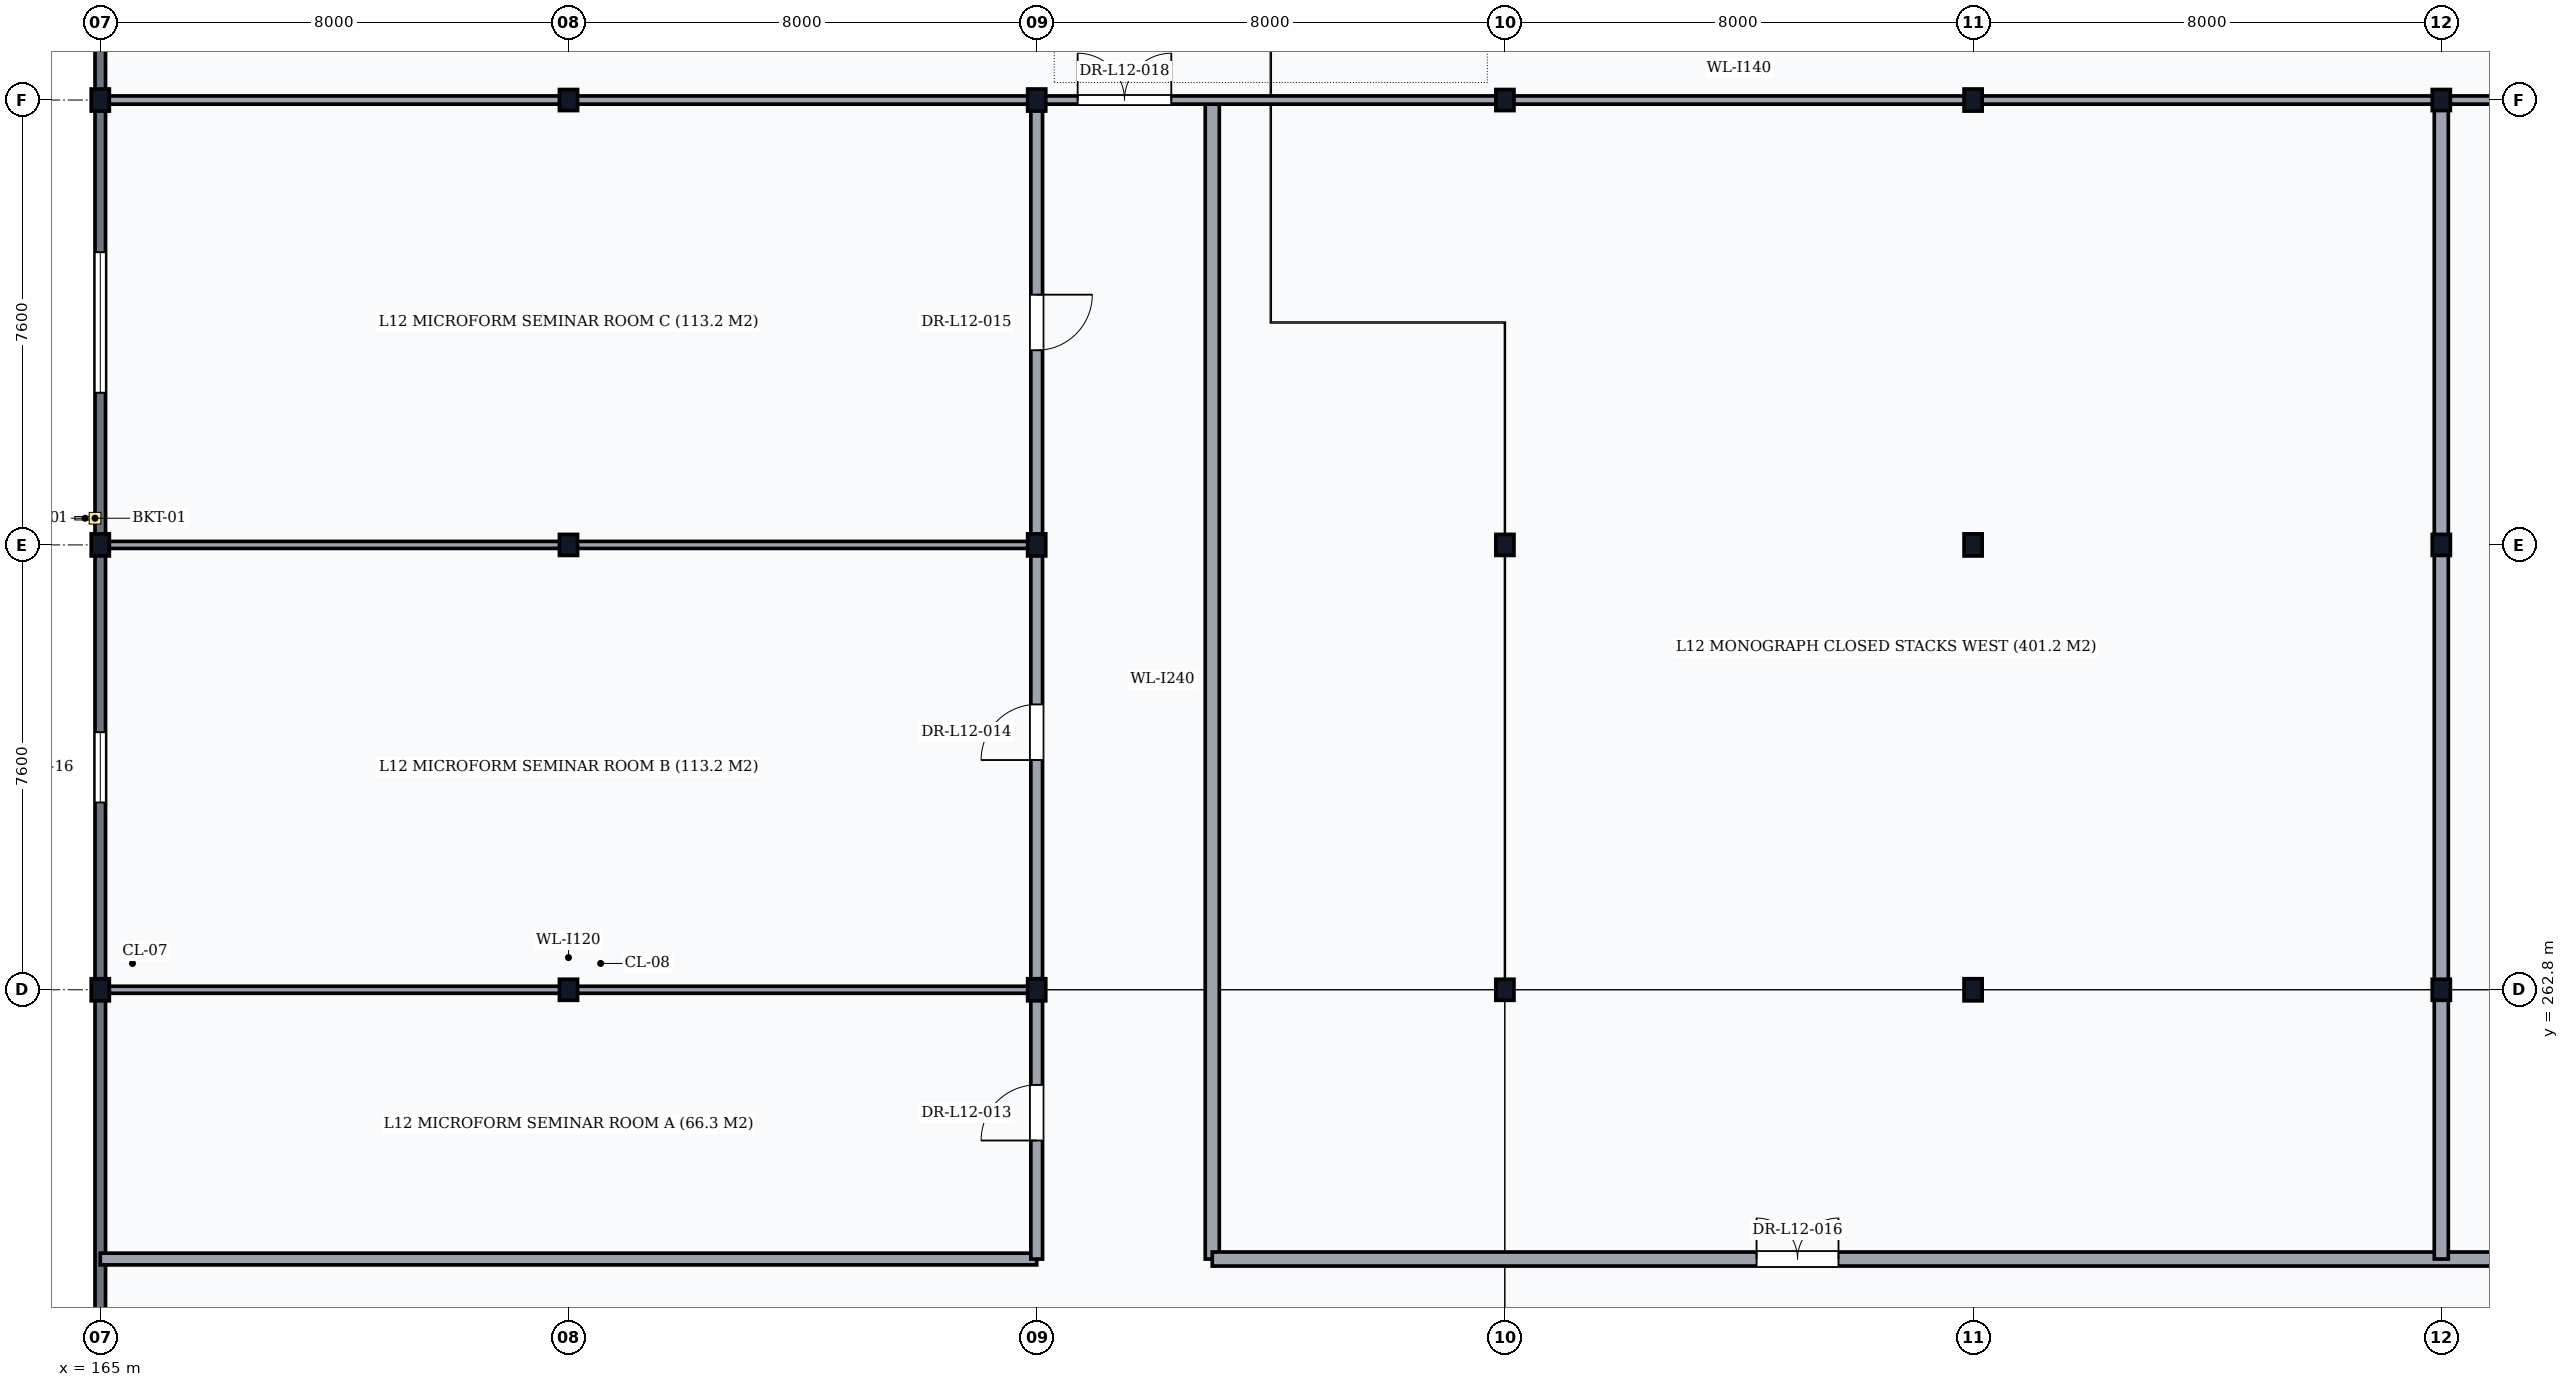
"""IFC4 building model, lengths in metres.
Left out: names, types, materials, properties, quantities, classifications, styles, units other than length and angle.
Written with IfcOpenShell. Run it as: python <this file> out.ifc"""

import sys

from ifc_helpers import new_model, si_unit, direction, frame, frame_2d, origin, origin_2d, place, context, subcontext, project, spatial, rectangle, i_section, extrude, element, fill, save


model = new_model("IFC4")
c1 = context("Model", 3, precision=1e-05, world=origin(), true_north=direction((0.0, 1.0)))
c2 = subcontext(c1, "Body", "Model", "MODEL_VIEW")
j1 = project(units=[si_unit("LENGTHUNIT", "METRE"), si_unit("PLANEANGLEUNIT", "RADIAN")], contexts=[c1])
p1 = place(None, origin())
s1 = spatial("IfcSite", under=j1, at=p1, CompositionType="ELEMENT")
p2 = place(p1, origin())
s2 = spatial("IfcBuilding", under=s1, at=p2, CompositionType="ELEMENT")
p3 = place(p2, frame((0.0, 0.0, 47.7)))
s3 = spatial("IfcBuildingStorey", under=s2, at=p3, CompositionType="ELEMENT", Elevation=47.7)
for number, where, z_axis, x_axis in (
    (1, (165.0, 262.8, 0.0), (0.0, 0.0, 1.0), (1.0, 0.0, 0.0)),
    (2, (165.0, 270.4, 0.0), (0.0, 0.0, 1.0), (1.0, 0.0, 0.0)),
    (3, (165.0, 278.0, 0.0), (0.0, 0.0, 1.0), (1.0, 0.0, 0.0)),
):
    element("IfcColumn", number, at=place(p3, frame(where, z_axis=z_axis, x_axis=x_axis)), inside=s3, PredefinedType="COLUMN", context=c2, shape_type="SweptSolid", body=[
        extrude(i_section(OverallWidth=0.309, OverallDepth=0.377, WebThickness=0.021, FlangeThickness=0.04, FilletRadius=0.027, at=origin_2d()), origin(), (0.0, 0.0, 1.0), 3.9),
    ])
for number, where, z_axis, x_axis in (
    (4, (173.0, 262.8, 0.0), (0.0, 0.0, 1.0), (1.0, 0.0, 0.0)),
    (5, (173.0, 270.4, 0.0), (0.0, 0.0, 1.0), (1.0, 0.0, 0.0)),
    (6, (173.0, 278.0, 0.0), (0.0, 0.0, 1.0), (1.0, 0.0, 0.0)),
):
    element("IfcColumn", number, at=place(p3, frame(where, z_axis=z_axis, x_axis=x_axis)), inside=s3, PredefinedType="COLUMN", context=c2, shape_type="SweptSolid", body=[
        extrude(i_section(OverallWidth=0.309, OverallDepth=0.359, WebThickness=0.021, FlangeThickness=0.04, FilletRadius=0.027, at=origin_2d()), origin(), (0.0, 0.0, 1.0), 3.9),
    ])
for number, where, z_axis, x_axis in (
    (7, (181.0, 262.8, 0.0), (0.0, 0.0, 1.0), (1.0, 0.0, 0.0)),
    (8, (181.0, 270.4, 0.0), (0.0, 0.0, 1.0), (1.0, 0.0, 0.0)),
    (9, (181.0, 278.0, 0.0), (0.0, 0.0, 1.0), (1.0, 0.0, 0.0)),
):
    element("IfcColumn", number, at=place(p3, frame(where, z_axis=z_axis, x_axis=x_axis)), inside=s3, PredefinedType="COLUMN", context=c2, shape_type="SweptSolid", body=[
        extrude(i_section(OverallWidth=0.309, OverallDepth=0.377, WebThickness=0.021, FlangeThickness=0.04, FilletRadius=0.027, at=origin_2d()), origin(), (0.0, 0.0, 1.0), 3.9),
    ])
for number, where, z_axis, x_axis in (
    (10, (189.0, 262.8, 0.0), (0.0, 0.0, 1.0), (1.0, 0.0, 0.0)),
    (11, (189.0, 270.4, 0.0), (0.0, 0.0, 1.0), (1.0, 0.0, 0.0)),
    (12, (189.0, 278.0, 0.0), (0.0, 0.0, 1.0), (1.0, 0.0, 0.0)),
):
    element("IfcColumn", number, at=place(p3, frame(where, z_axis=z_axis, x_axis=x_axis)), inside=s3, PredefinedType="COLUMN", context=c2, shape_type="SweptSolid", body=[
        extrude(i_section(OverallWidth=0.309, OverallDepth=0.359, WebThickness=0.021, FlangeThickness=0.04, FilletRadius=0.027, at=origin_2d()), origin(), (0.0, 0.0, 1.0), 3.9),
    ])
for number, where, z_axis, x_axis in (
    (13, (197.0, 262.8, 0.0), (0.0, 0.0, 1.0), (1.0, 0.0, 0.0)),
    (14, (197.0, 270.4, 0.0), (0.0, 0.0, 1.0), (1.0, 0.0, 0.0)),
    (15, (197.0, 278.0, 0.0), (0.0, 0.0, 1.0), (1.0, 0.0, 0.0)),
):
    element("IfcColumn", number, at=place(p3, frame(where, z_axis=z_axis, x_axis=x_axis)), inside=s3, PredefinedType="COLUMN", context=c2, shape_type="SweptSolid", body=[
        extrude(i_section(OverallWidth=0.309, OverallDepth=0.377, WebThickness=0.021, FlangeThickness=0.04, FilletRadius=0.027, at=origin_2d()), origin(), (0.0, 0.0, 1.0), 3.9),
    ])
for number, where, z_axis, x_axis in (
    (16, (205.0, 262.8, 0.0), (0.0, 0.0, 1.0), (1.0, 0.0, 0.0)),
    (17, (205.0, 270.4, 0.0), (0.0, 0.0, 1.0), (1.0, 0.0, 0.0)),
    (18, (205.0, 278.0, 0.0), (0.0, 0.0, 1.0), (1.0, 0.0, 0.0)),
):
    element("IfcColumn", number, at=place(p3, frame(where, z_axis=z_axis, x_axis=x_axis)), inside=s3, PredefinedType="COLUMN", context=c2, shape_type="SweptSolid", body=[
        extrude(i_section(OverallWidth=0.309, OverallDepth=0.359, WebThickness=0.021, FlangeThickness=0.04, FilletRadius=0.027, at=origin_2d()), origin(), (0.0, 0.0, 1.0), 3.9),
    ])
p4 = place(p3, frame((165.0, 255.206, 0.0), z_axis=(0.0, 0.0, 1.0), x_axis=(0.0, 1.0, 0.0)))
e19 = element("IfcWall", 19, at=p4, inside=s3, PredefinedType="SOLIDWALL", context=c2, shape_type="SweptSolid", body=[
    extrude(rectangle(XDim=7.588, YDim=0.18, at=frame_2d((3.794, 0.0))), origin(), (0.0, 0.0, 1.0), 3.338),
])
p5 = place(p3, frame((165.0, 262.806, 0.0), z_axis=(0.0, 0.0, 1.0), x_axis=(0.0, 1.0, 0.0)))
e20 = element("IfcWall", 20, at=p5, inside=s3, PredefinedType="SOLIDWALL", context=c2, shape_type="SweptSolid", body=[
    extrude(rectangle(XDim=7.588, YDim=0.18, at=frame_2d((3.794, 0.0))), origin(), (0.0, 0.0, 1.0), 3.338),
])
p6 = place(p5, frame((3.194, 0.0, 0.95)))
e21 = element("IfcOpeningElement", 21, at=p6, cuts=e20, PredefinedType="OPENING", context=c2, shape_type="SweptSolid", body=[
    extrude(rectangle(XDim=1.2, YDim=1.8, at=frame_2d((0.6, 0.9))), frame((0.0, 0.105, 0.0), z_axis=(0.0, -1.0, 0.0), x_axis=(1.0, 0.0, 0.0)), (0.0, 0.0, 1.0), 0.21),
])
p7 = place(p3, frame((165.0, 270.406, 0.0), z_axis=(0.0, 0.0, 1.0), x_axis=(0.0, 1.0, 0.0)))
e22 = element("IfcWall", 22, at=p7, inside=s3, PredefinedType="SOLIDWALL", context=c2, shape_type="SweptSolid", body=[
    extrude(rectangle(XDim=7.588, YDim=0.18, at=frame_2d((3.794, 0.0))), origin(), (0.0, 0.0, 1.0), 3.338),
])
p8 = place(p7, frame((2.594, 0.0, 0.95)))
e23 = element("IfcOpeningElement", 23, at=p8, cuts=e22, PredefinedType="OPENING", context=c2, shape_type="SweptSolid", body=[
    extrude(rectangle(XDim=2.4, YDim=2.2, at=frame_2d((1.2, 1.1))), frame((0.0, 0.105, 0.0), z_axis=(0.0, -1.0, 0.0), x_axis=(1.0, 0.0, 0.0)), (0.0, 0.0, 1.0), 0.21),
])
p9 = place(p3, frame((165.0, 278.006, 0.0), z_axis=(0.0, 0.0, 1.0), x_axis=(0.0, 1.0, 0.0)))
e24 = element("IfcWall", 24, at=p9, inside=s3, PredefinedType="SOLIDWALL", context=c2, shape_type="SweptSolid", body=[
    extrude(rectangle(XDim=7.588, YDim=0.18, at=frame_2d((3.794, 0.0))), origin(), (0.0, 0.0, 1.0), 3.338),
])
p10 = place(p9, frame((2.694, 0.0, 0.95)))
e25 = element("IfcOpeningElement", 25, at=p10, cuts=e24, PredefinedType="OPENING", context=c2, shape_type="SweptSolid", body=[
    extrude(rectangle(XDim=2.2, YDim=2.1, at=frame_2d((1.1, 1.05))), frame((0.0, 0.105, 0.0), z_axis=(0.0, -1.0, 0.0), x_axis=(1.0, 0.0, 0.0)), (0.0, 0.0, 1.0), 0.21),
])
p11 = place(p3, frame((165.0, 258.2, 0.0), z_axis=(0.0, 0.0, 1.0), x_axis=(1.0, 0.0, 0.0)))
e26 = element("IfcWall", 26, at=p11, inside=s3, PredefinedType="PARTITIONING", context=c2, shape_type="SweptSolid", body=[
    extrude(rectangle(XDim=16.0, YDim=0.2, at=frame_2d((8.0, 0.0))), origin(), (0.0, 0.0, 1.0), 3.61),
])
p12 = place(p3, frame((181.0, 258.2, 0.0), z_axis=(0.0, 0.0, 1.0), x_axis=(0.0, 1.0, 0.0)))
e27 = element("IfcWall", 27, at=p12, inside=s3, PredefinedType="PARTITIONING", context=c2, shape_type="SweptSolid", body=[
    extrude(rectangle(XDim=19.8, YDim=0.2, at=frame_2d((9.9, 0.0))), origin(), (0.0, 0.0, 1.0), 3.208),
])
p13 = place(p12, frame((2.025, 0.0, 0.0)))
e28 = element("IfcOpeningElement", 28, at=p13, cuts=e27, PredefinedType="OPENING", context=c2, shape_type="SweptSolid", body=[
    extrude(rectangle(XDim=0.95, YDim=2.1, at=frame_2d((0.475, 1.05))), frame((0.0, 0.115, 0.0), z_axis=(0.0, -1.0, 0.0), x_axis=(1.0, 0.0, 0.0)), (0.0, 0.0, 1.0), 0.23),
])
p14 = place(p12, frame((8.525, 0.0, 0.0)))
e29 = element("IfcOpeningElement", 29, at=p14, cuts=e27, PredefinedType="OPENING", context=c2, shape_type="SweptSolid", body=[
    extrude(rectangle(XDim=0.95, YDim=2.1, at=frame_2d((0.475, 1.05))), frame((0.0, 0.115, 0.0), z_axis=(0.0, -1.0, 0.0), x_axis=(1.0, 0.0, 0.0)), (0.0, 0.0, 1.0), 0.23),
])
p15 = place(p12, frame((15.525, 0.0, 0.0)))
e30 = element("IfcOpeningElement", 30, at=p15, cuts=e27, PredefinedType="OPENING", context=c2, shape_type="SweptSolid", body=[
    extrude(rectangle(XDim=0.95, YDim=2.1, at=frame_2d((0.475, 1.05))), frame((0.0, 0.115, 0.0), z_axis=(0.0, -1.0, 0.0), x_axis=(1.0, 0.0, 0.0)), (0.0, 0.0, 1.0), 0.23),
])
for number, where, z_axis, x_axis in (
    (31, (165.0, 262.8, 0.0), (0.0, 0.0, 1.0), (1.0, 0.0, 0.0)),
    (32, (165.0, 270.4, 0.0), (0.0, 0.0, 1.0), (1.0, 0.0, 0.0)),
):
    element("IfcWall", number, at=place(p3, frame(where, z_axis=z_axis, x_axis=x_axis)), inside=s3, PredefinedType="PARTITIONING", context=c2, shape_type="SweptSolid", body=[
        extrude(rectangle(XDim=16.0, YDim=0.12, at=frame_2d((8.0, 0.0))), origin(), (0.0, 0.0, 1.0), 3.108),
    ])
p16 = place(p3, frame((184.0, 258.2, 0.0), z_axis=(0.0, 0.0, 1.0), x_axis=(0.0, 1.0, 0.0)))
e33 = element("IfcWall", 33, at=p16, inside=s3, PredefinedType="PARTITIONING", context=c2, shape_type="SweptSolid", body=[
    extrude(rectangle(XDim=19.8, YDim=0.24, at=frame_2d((9.9, 0.0))), origin(), (0.0, 0.0, 1.0), 3.61),
])
p17 = place(p3, frame((184.0, 258.2, 0.0), z_axis=(0.0, 0.0, 1.0), x_axis=(1.0, 0.0, 0.0)))
e34 = element("IfcWall", 34, at=p17, inside=s3, PredefinedType="PARTITIONING", context=c2, shape_type="SweptSolid", body=[
    extrude(rectangle(XDim=37.0, YDim=0.24, at=frame_2d((18.5, 0.0))), origin(), (0.0, 0.0, 1.0), 3.61),
])
p18 = place(p17, frame((9.3, 0.0, 0.0)))
e35 = element("IfcOpeningElement", 35, at=p18, cuts=e34, PredefinedType="OPENING", context=c2, shape_type="SweptSolid", body=[
    extrude(rectangle(XDim=1.4, YDim=2.1, at=frame_2d((0.7, 1.05))), frame((0.0, 0.135, 0.0), z_axis=(0.0, -1.0, 0.0), x_axis=(1.0, 0.0, 0.0)), (0.0, 0.0, 1.0), 0.27),
])
p19 = place(p17, frame((27.06, 0.0, 0.0)))
e36 = element("IfcOpeningElement", 36, at=p19, cuts=e34, PredefinedType="OPENING", context=c2, shape_type="SweptSolid", body=[
    extrude(rectangle(XDim=1.4, YDim=2.1, at=frame_2d((0.7, 1.05))), frame((0.0, 0.135, 0.0), z_axis=(0.0, -1.0, 0.0), x_axis=(1.0, 0.0, 0.0)), (0.0, 0.0, 1.0), 0.27),
])
p20 = place(p3, frame((205.0, 258.2, 0.0), z_axis=(0.0, 0.0, 1.0), x_axis=(0.0, 1.0, 0.0)))
e37 = element("IfcWall", 37, at=p20, inside=s3, PredefinedType="PARTITIONING", context=c2, shape_type="SweptSolid", body=[
    extrude(rectangle(XDim=19.8, YDim=0.24, at=frame_2d((9.9, 0.0))), origin(), (0.0, 0.0, 1.0), 3.208),
])
p21 = place(p3, frame((165.0, 278.0, 0.0), z_axis=(0.0, 0.0, 1.0), x_axis=(1.0, 0.0, 0.0)))
e38 = element("IfcWall", 38, at=p21, inside=s3, PredefinedType="PARTITIONING", context=c2, shape_type="SweptSolid", body=[
    extrude(rectangle(XDim=56.0, YDim=0.14, at=frame_2d((28.0, 0.0))), origin(), (0.0, 0.0, 1.0), 3.108),
])
p22 = place(p21, frame((16.7, 0.0, 0.0)))
e39 = element("IfcOpeningElement", 39, at=p22, cuts=e38, PredefinedType="OPENING", context=c2, shape_type="SweptSolid", body=[
    extrude(rectangle(XDim=1.6, YDim=2.25, at=frame_2d((0.8, 1.125))), frame((0.0, 0.085, 0.0), z_axis=(0.0, -1.0, 0.0), x_axis=(1.0, 0.0, 0.0)), (0.0, 0.0, 1.0), 0.17),
])
p23 = place(p6, origin())
e40 = element("IfcWindow", 40, at=p23, inside=s3, PartitioningType="SINGLE_PANEL", PredefinedType="WINDOW", context=c2, shape_type="SweptSolid", body=[
    extrude(rectangle(XDim=1.2, YDim=1.8, at=frame_2d((0.6, 0.9))), frame((0.0, 0.03, 0.0), z_axis=(0.0, -1.0, 0.0), x_axis=(1.0, 0.0, 0.0)), (0.0, 0.0, 1.0), 0.06),
])
fill(e21, e40)
p24 = place(p8, origin())
e41 = element("IfcWindow", 41, at=p24, inside=s3, PartitioningType="DOUBLE_PANEL_VERTICAL", PredefinedType="WINDOW", context=c2, shape_type="SweptSolid", body=[
    extrude(rectangle(XDim=2.4, YDim=2.2, at=frame_2d((1.2, 1.1))), frame((0.0, 0.03, 0.0), z_axis=(0.0, -1.0, 0.0), x_axis=(1.0, 0.0, 0.0)), (0.0, 0.0, 1.0), 0.06),
])
fill(e23, e41)
p25 = place(p13, origin())
e42 = element("IfcDoor", 42, at=p25, inside=s3, OperationType="SINGLE_SWING_LEFT", PredefinedType="DOOR", context=c2, shape_type="SweptSolid", body=[
    extrude(rectangle(XDim=0.95, YDim=2.1, at=frame_2d((0.475, 1.05))), frame((0.0, 0.025, 0.0), z_axis=(0.0, -1.0, 0.0), x_axis=(1.0, 0.0, 0.0)), (0.0, 0.0, 1.0), 0.05),
])
fill(e28, e42)
p26 = place(p14, origin())
e43 = element("IfcDoor", 43, at=p26, inside=s3, OperationType="SINGLE_SWING_LEFT", PredefinedType="DOOR", context=c2, shape_type="SweptSolid", body=[
    extrude(rectangle(XDim=0.95, YDim=2.1, at=frame_2d((0.475, 1.05))), frame((0.0, 0.025, 0.0), z_axis=(0.0, -1.0, 0.0), x_axis=(1.0, 0.0, 0.0)), (0.0, 0.0, 1.0), 0.05),
])
fill(e29, e43)
p27 = place(p15, origin())
e44 = element("IfcDoor", 44, at=p27, inside=s3, OperationType="SINGLE_SWING_RIGHT", PredefinedType="DOOR", context=c2, shape_type="SweptSolid", body=[
    extrude(rectangle(XDim=0.95, YDim=2.1, at=frame_2d((0.475, 1.05))), frame((0.0, 0.025, 0.0), z_axis=(0.0, -1.0, 0.0), x_axis=(1.0, 0.0, 0.0)), (0.0, 0.0, 1.0), 0.05),
])
fill(e30, e44)
p28 = place(p18, origin())
e45 = element("IfcDoor", 45, at=p28, inside=s3, OperationType="DOUBLE_DOOR_SINGLE_SWING", PredefinedType="DOOR", context=c2, shape_type="SweptSolid", body=[
    extrude(rectangle(XDim=1.4, YDim=2.1, at=frame_2d((0.7, 1.05))), frame((0.0, 0.025, 0.0), z_axis=(0.0, -1.0, 0.0), x_axis=(1.0, 0.0, 0.0)), (0.0, 0.0, 1.0), 0.05),
])
fill(e35, e45)
p29 = place(p22, origin())
e46 = element("IfcDoor", 46, at=p29, inside=s3, OperationType="DOUBLE_DOOR_SINGLE_SWING", PredefinedType="DOOR", context=c2, shape_type="SweptSolid", body=[
    extrude(rectangle(XDim=1.6, YDim=2.25, at=frame_2d((0.8, 1.125))), frame((0.0, 0.025, 0.0), z_axis=(0.0, -1.0, 0.0), x_axis=(1.0, 0.0, 0.0)), (0.0, 0.0, 1.0), 0.05),
])
fill(e39, e46)
save(model, sys.argv[1])
